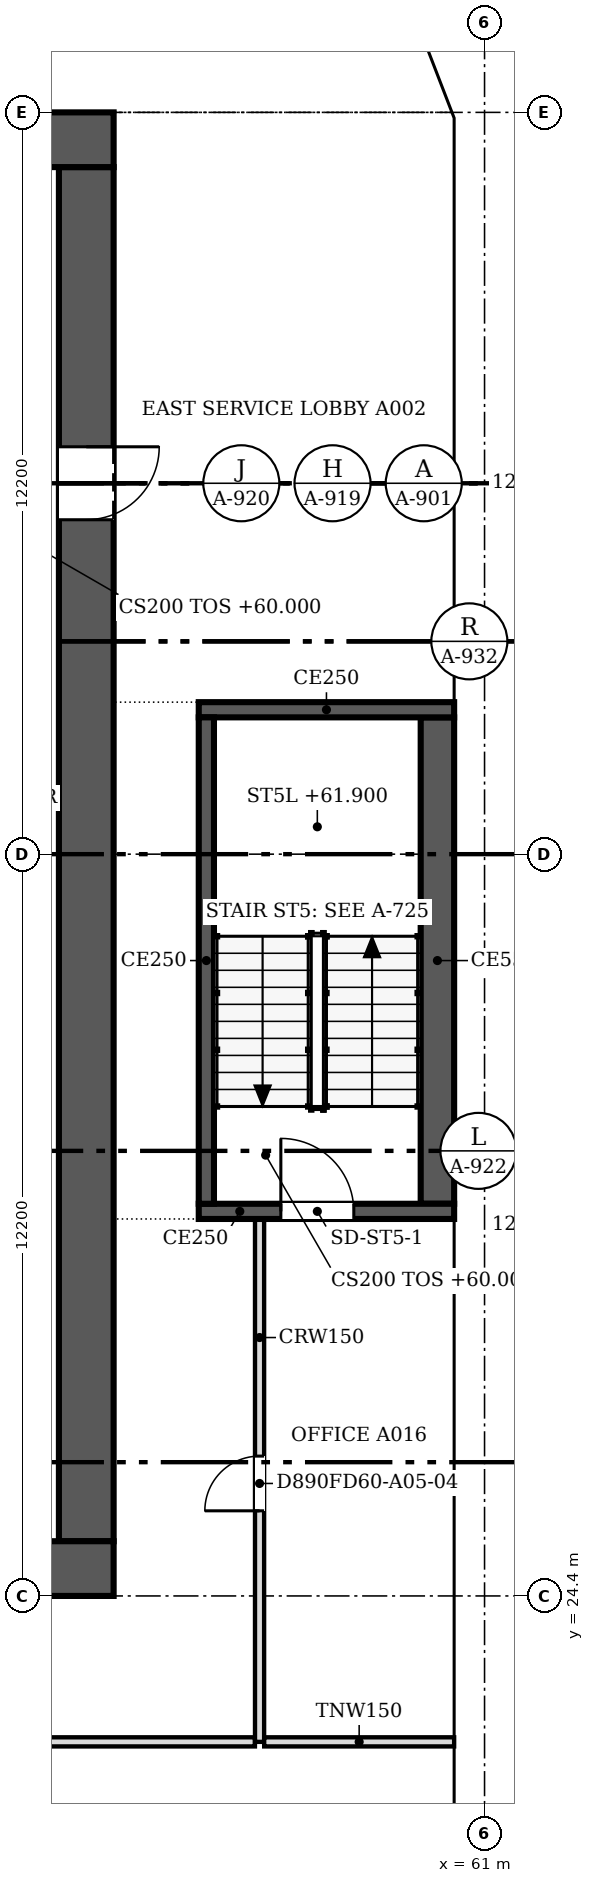
"""IFC4 building model, lengths in metres.
Left out: names, types, materials, properties, quantities, classifications, styles, units other than length and angle.
Written with IfcOpenShell. Run it as: python <this file> out.ifc"""

import sys

from ifc_helpers import new_model, si_unit, direction, frame, frame_2d, origin, place, context, subcontext, project, spatial, polyline, rectangle, outline, extrude, faceted_brep, source, transform, mapped, element, fill, save


model = new_model("IFC4")
c1 = context("Model", 3, precision=1e-05, world=origin(), true_north=direction((0.0, 1.0)))
c2 = subcontext(c1, "Body", "Model", "MODEL_VIEW")
j1 = project(units=[si_unit("LENGTHUNIT", "METRE"), si_unit("PLANEANGLEUNIT", "RADIAN")], contexts=[c1])
p1 = place(None, origin())
s1 = spatial("IfcSite", under=j1, at=p1, CompositionType="ELEMENT")
p2 = place(p1, origin())
s2 = spatial("IfcBuilding", under=s1, at=p2, CompositionType="ELEMENT")
p3 = place(p2, frame((0.0, 0.0, 60.0)))
s3 = spatial("IfcBuildingStorey", under=s2, at=p3, CompositionType="ELEMENT", Elevation=60.0)
m1 = source(origin(), c2, "Body", "SweptSolid", [
    extrude(outline(polyline([(3.05, 0.0), (6.1, 3.8), (3.05, 7.6), (0.0, 3.8), (3.05, 0.0)])), frame((0.0, 0.25, 0.0), z_axis=(0.0, -1.0, 0.0), x_axis=(1.0, 0.0, 0.0)), (0.0, 0.0, 1.0), 0.5),
])
p4 = place(p3, frame((60.75, 15.25, -3.8), z_axis=(0.0, 0.0, 1.0), x_axis=(0.0, 1.0, 0.0)))
e1 = element("IfcWall", 1, at=p4, inside=s3, PredefinedType="SOLIDWALL", context=c2, shape_type="MappedRepresentation", body=[
    mapped(m1, transform((0.0, 0.0, 0.0), scale=1.0)),
])
m2 = source(origin(), c2, "Body", "SweptSolid", [
    extrude(outline(polyline([(3.05, 0.399), (5.78, 3.8), (3.05, 7.201), (0.321, 3.8), (3.05, 0.399)])), frame((0.0, 0.26, 0.0), z_axis=(0.0, -1.0, 0.0), x_axis=(1.0, 0.0, 0.0)), (0.0, 0.0, 1.0), 0.52),
])
p5 = place(p4, origin())
e2 = element("IfcOpeningElement", 2, at=p5, cuts=e1, PredefinedType="OPENING", context=c2, shape_type="MappedRepresentation", body=[
    mapped(m2, transform((0.0, 0.0, 0.0), scale=1.0)),
])
m3 = source(origin(), c2, "Body", "Brep", [
    faceted_brep([(3.05, -0.25, 0.0), (6.1, -0.25, 3.8), (6.1, -0.25, 3.8), (3.05, -0.25, 7.6), (0.0, -0.25, 3.8), (0.0, 0.25, 3.8), (3.05, 0.25, 7.6), (6.1, 0.25, 3.8), (6.1, 0.25, 3.8), (3.05, 0.25, 0.0)], [[[0, 1, 2, 3, 4]], [[5, 6, 7, 8, 9]], [[9, 8, 1, 0]], [[7, 6, 3, 2]], [[6, 5, 4, 3]], [[5, 9, 0, 4]], [[1, 8, 7, 2]]]),
])
p6 = place(p3, frame((60.75, 21.35, -3.8), z_axis=(0.0, 0.0, 1.0), x_axis=(0.0, 1.0, 0.0)))
e3 = element("IfcWall", 3, at=p6, inside=s3, PredefinedType="SOLIDWALL", context=c2, shape_type="MappedRepresentation", body=[
    mapped(m3, transform((0.0, 0.0, 0.0), scale=1.0)),
])
p7 = place(p6, origin())
e4 = element("IfcOpeningElement", 4, at=p7, cuts=e3, PredefinedType="OPENING", context=c2, shape_type="MappedRepresentation", body=[
    mapped(m2, transform((0.0, 0.0, 0.0), scale=1.0)),
])
p8 = place(p3, frame((60.75, 27.45, -3.8), z_axis=(0.0, 0.0, 1.0), x_axis=(0.0, 1.0, 0.0)))
e5 = element("IfcWall", 5, at=p8, inside=s3, PredefinedType="SOLIDWALL", context=c2, shape_type="MappedRepresentation", body=[
    mapped(m1, transform((0.0, 0.0, 0.0), scale=1.0)),
])
p9 = place(p8, origin())
e6 = element("IfcOpeningElement", 6, at=p9, cuts=e5, PredefinedType="OPENING", context=c2, shape_type="MappedRepresentation", body=[
    mapped(m2, transform((0.0, 0.0, 0.0), scale=1.0)),
])
p10 = place(p3, frame((60.75, 33.55, -3.8), z_axis=(0.0, 0.0, 1.0), x_axis=(0.0, 1.0, 0.0)))
e7 = element("IfcWall", 7, at=p10, inside=s3, PredefinedType="SOLIDWALL", context=c2, shape_type="MappedRepresentation", body=[
    mapped(m3, transform((0.0, 0.0, 0.0), scale=1.0)),
])
p11 = place(p10, origin())
e8 = element("IfcOpeningElement", 8, at=p11, cuts=e7, PredefinedType="OPENING", context=c2, shape_type="MappedRepresentation", body=[
    mapped(m2, transform((0.0, 0.0, 0.0), scale=1.0)),
])
p12 = place(p3, frame((60.75, 39.65, -3.8), z_axis=(0.0, 0.0, 1.0), x_axis=(0.0, 1.0, 0.0)))
e9 = element("IfcWall", 9, at=p12, inside=s3, PredefinedType="SOLIDWALL", context=c2, shape_type="MappedRepresentation", body=[
    mapped(m1, transform((0.0, 0.0, 0.0), scale=1.0)),
])
p13 = place(p12, origin())
e10 = element("IfcOpeningElement", 10, at=p13, cuts=e9, PredefinedType="OPENING", context=c2, shape_type="MappedRepresentation", body=[
    mapped(m2, transform((0.0, 0.0, 0.0), scale=1.0)),
])
m4 = source(origin(), c2, "Body", "Brep", [
    faceted_brep([(3.003, -0.25, 0.0), (3.05, -0.25, 0.06), (3.05, -0.25, 7.54), (3.003, -0.25, 7.6), (0.0, -0.25, 3.8), (0.0, 0.25, 3.8), (2.957, 0.25, 7.541), (2.957, 0.25, 0.059), (3.003, 0.0, 0.0), (3.003, 0.0, 7.6)], [[[0, 1, 2, 3, 4]], [[5, 6, 7]], [[1, 0, 8]], [[9, 3, 2]], [[6, 5, 4, 3, 9]], [[5, 7, 8, 0, 4]], [[1, 8, 7, 6, 9, 2]]]),
])
p14 = place(p3, frame((60.75, 45.75, -3.8), z_axis=(0.0, 0.0, 1.0), x_axis=(0.0, 1.0, 0.0)))
e11 = element("IfcWall", 11, at=p14, inside=s3, PredefinedType="SOLIDWALL", context=c2, shape_type="MappedRepresentation", body=[
    mapped(m4, transform((0.0, 0.0, 0.0), scale=1.0)),
])
m5 = source(origin(), c2, "Body", "SweptSolid", [
    extrude(outline(polyline([(2.803, 6.944), (0.319, 3.8), (2.803, 0.656), (2.803, 6.944)])), frame((0.0, 0.26, 0.0), z_axis=(0.0, -1.0, 0.0), x_axis=(1.0, 0.0, 0.0)), (0.0, 0.0, 1.0), 0.52),
])
p15 = place(p14, origin())
e12 = element("IfcOpeningElement", 12, at=p15, cuts=e11, PredefinedType="OPENING", context=c2, shape_type="MappedRepresentation", body=[
    mapped(m5, transform((0.0, 0.0, 0.0), scale=1.0)),
])
m6 = source(origin(), c2, "Body", "Brep", [
    faceted_brep([(0.047, -0.25, 0.0), (2.997, -0.25, 3.8), (0.047, -0.25, 7.6), (0.0, -0.25, 7.541), (0.0, -0.25, 0.059), (0.093, 0.25, 7.54), (2.944, 0.25, 3.868), (2.944, 0.25, 3.732), (0.093, 0.25, 0.06), (2.997, 0.0, 3.8), (0.047, 0.0, 0.0), (0.047, 0.0, 7.6)], [[[0, 1, 2, 3, 4]], [[5, 6, 7, 8]], [[8, 7, 9, 1, 0, 10]], [[6, 5, 11, 2, 1, 9]], [[3, 2, 11]], [[10, 0, 4]], [[8, 10, 4, 3, 11, 5]], [[9, 7, 6]]]),
])
p16 = place(p3, frame((60.767, 48.71, -3.8), z_axis=(0.0, 0.0, 1.0), x_axis=(-0.359901446078, 0.932990326376, 0.0)))
e13 = element("IfcWall", 13, at=p16, inside=s3, PredefinedType="SOLIDWALL", context=c2, shape_type="MappedRepresentation", body=[
    mapped(m6, transform((0.0, 0.0, 0.0), scale=1.0)),
])
m7 = source(origin(), c2, "Body", "SweptSolid", [
    extrude(outline(polyline([(0.247, 0.665), (2.681, 3.8), (0.247, 6.935), (0.247, 0.665)])), frame((0.0, 0.26, 0.0), z_axis=(0.0, -1.0, 0.0), x_axis=(1.0, 0.0, 0.0)), (0.0, 0.0, 1.0), 0.52),
])
p17 = place(p16, origin())
e14 = element("IfcOpeningElement", 14, at=p17, cuts=e13, PredefinedType="OPENING", context=c2, shape_type="MappedRepresentation", body=[
    mapped(m7, transform((0.0, 0.0, 0.0), scale=1.0)),
])
m8 = source(origin(), c2, "Body", "Brep", [
    faceted_brep([(3.05, -0.25, 0.0), (6.1, -0.25, 3.8), (6.1, -0.25, 3.8), (0.0, -0.25, 3.8), (0.0, 0.25, 3.8), (6.1, 0.25, 3.8), (6.1, 0.25, 3.8), (3.05, 0.25, 0.0)], [[[0, 1, 2, 3]], [[4, 5, 6, 7]], [[7, 6, 1, 0]], [[5, 4, 3, 2]], [[4, 7, 0, 3]], [[1, 6, 5, 2]]]),
])
p18 = place(p3, frame((60.75, 18.3, 0.0), z_axis=(0.0, 0.0, 1.0), x_axis=(0.0, 1.0, 0.0)))
e15 = element("IfcWall", 15, at=p18, inside=s3, PredefinedType="SOLIDWALL", context=c2, shape_type="MappedRepresentation", body=[
    mapped(m8, transform((0.0, 0.0, 0.0), scale=1.0)),
])
m9 = source(origin(), c2, "Body", "SweptSolid", [
    extrude(outline(polyline([(3.05, 0.399), (5.579, 3.55), (0.521, 3.55), (3.05, 0.399)])), frame((0.0, 0.26, 0.0), z_axis=(0.0, -1.0, 0.0), x_axis=(1.0, 0.0, 0.0)), (0.0, 0.0, 1.0), 0.52),
])
p19 = place(p18, origin())
e16 = element("IfcOpeningElement", 16, at=p19, cuts=e15, PredefinedType="OPENING", context=c2, shape_type="MappedRepresentation", body=[
    mapped(m9, transform((0.0, 0.0, 0.0), scale=1.0)),
])
m10 = source(origin(), c2, "Body", "SweptSolid", [
    extrude(outline(polyline([(3.05, 0.0), (6.1, 3.8), (0.0, 3.8), (3.05, 0.0)])), frame((0.0, 0.25, 0.0), z_axis=(0.0, -1.0, 0.0), x_axis=(1.0, 0.0, 0.0)), (0.0, 0.0, 1.0), 0.5),
])
p20 = place(p3, frame((60.75, 24.4, 0.0), z_axis=(0.0, 0.0, 1.0), x_axis=(0.0, 1.0, 0.0)))
e17 = element("IfcWall", 17, at=p20, inside=s3, PredefinedType="SOLIDWALL", context=c2, shape_type="MappedRepresentation", body=[
    mapped(m10, transform((0.0, 0.0, 0.0), scale=1.0)),
])
p21 = place(p20, origin())
e18 = element("IfcOpeningElement", 18, at=p21, cuts=e17, PredefinedType="OPENING", context=c2, shape_type="MappedRepresentation", body=[
    mapped(m9, transform((0.0, 0.0, 0.0), scale=1.0)),
])
p22 = place(p3, frame((60.75, 30.5, 0.0), z_axis=(0.0, 0.0, 1.0), x_axis=(0.0, 1.0, 0.0)))
e19 = element("IfcWall", 19, at=p22, inside=s3, PredefinedType="SOLIDWALL", context=c2, shape_type="MappedRepresentation", body=[
    mapped(m10, transform((0.0, 0.0, 0.0), scale=1.0)),
])
p23 = place(p22, origin())
e20 = element("IfcOpeningElement", 20, at=p23, cuts=e19, PredefinedType="OPENING", context=c2, shape_type="MappedRepresentation", body=[
    mapped(m9, transform((0.0, 0.0, 0.0), scale=1.0)),
])
p24 = place(p3, frame((60.75, 36.6, 0.0), z_axis=(0.0, 0.0, 1.0), x_axis=(0.0, 1.0, 0.0)))
e21 = element("IfcWall", 21, at=p24, inside=s3, PredefinedType="SOLIDWALL", context=c2, shape_type="MappedRepresentation", body=[
    mapped(m8, transform((0.0, 0.0, 0.0), scale=1.0)),
])
p25 = place(p24, origin())
e22 = element("IfcOpeningElement", 22, at=p25, cuts=e21, PredefinedType="OPENING", context=c2, shape_type="MappedRepresentation", body=[
    mapped(m9, transform((0.0, 0.0, 0.0), scale=1.0)),
])
m11 = source(origin(), c2, "Body", "Brep", [
    faceted_brep([(3.05, -0.25, 0.0), (6.053, -0.25, 3.8), (0.0, -0.25, 3.8), (0.0, 0.25, 3.8), (6.007, 0.25, 3.8), (6.007, 0.25, 3.741), (3.05, 0.25, 0.0), (6.053, 0.0, 3.8)], [[[0, 1, 2]], [[3, 4, 5, 6]], [[6, 5, 7, 1, 0]], [[4, 3, 2, 1, 7]], [[3, 6, 0, 2]], [[5, 4, 7]]]),
])
p26 = place(p3, frame((60.75, 42.7, 0.0), z_axis=(0.0, 0.0, 1.0), x_axis=(0.0, 1.0, 0.0)))
e23 = element("IfcWall", 23, at=p26, inside=s3, PredefinedType="SOLIDWALL", context=c2, shape_type="MappedRepresentation", body=[
    mapped(m11, transform((0.0, 0.0, 0.0), scale=1.0)),
])
m12 = source(origin(), c2, "Body", "SweptSolid", [
    extrude(outline(polyline([(3.049, 0.401), (5.537, 3.55), (0.521, 3.55), (3.049, 0.401)])), frame((0.0, 0.26, 0.0), z_axis=(0.0, -1.0, 0.0), x_axis=(1.0, 0.0, 0.0)), (0.0, 0.0, 1.0), 0.52),
])
p27 = place(p26, origin())
e24 = element("IfcOpeningElement", 24, at=p27, cuts=e23, PredefinedType="OPENING", context=c2, shape_type="MappedRepresentation", body=[
    mapped(m12, transform((0.0, 0.0, 0.0), scale=1.0)),
])
m13 = source(origin(), c2, "Body", "Brep", [
    faceted_brep([(2.95, -0.25, 0.0), (3.003, -0.25, 0.068), (3.003, -0.25, 3.8), (0.0, -0.25, 3.8), (0.047, 0.25, 3.8), (2.898, 0.25, 3.8), (2.898, 0.25, 0.068), (0.047, 0.25, 3.74), (2.95, 0.0, 0.0), (0.0, 0.0, 3.8)], [[[0, 1, 2, 3]], [[4, 5, 6, 7]], [[1, 0, 8]], [[5, 4, 9, 3, 2]], [[7, 6, 8, 0, 3, 9]], [[7, 9, 4]], [[1, 8, 6, 5, 2]]]),
])
p28 = place(p3, frame((60.75, 48.753, 0.0), z_axis=(0.0, 0.0, 1.0), x_axis=(-0.35992665181, 0.932980602862, 0.0)))
e25 = element("IfcWall", 25, at=p28, inside=s3, PredefinedType="SOLIDWALL", context=c2, shape_type="MappedRepresentation", body=[
    mapped(m13, transform((0.0, 0.0, 0.0), scale=1.0)),
])
m14 = source(origin(), c2, "Body", "SweptSolid", [
    extrude(outline(polyline([(2.75, 3.55), (0.511, 3.55), (2.75, 0.665), (2.75, 3.55)])), frame((0.0, 0.26, 0.0), z_axis=(0.0, -1.0, 0.0), x_axis=(1.0, 0.0, 0.0)), (0.0, 0.0, 1.0), 0.52),
])
p29 = place(p28, origin())
e26 = element("IfcOpeningElement", 26, at=p29, cuts=e25, PredefinedType="OPENING", context=c2, shape_type="MappedRepresentation", body=[
    mapped(m14, transform((0.0, 0.0, 0.0), scale=1.0)),
])
p30 = place(p3, frame((54.9, 24.85, 0.0), z_axis=(0.0, 0.0, 1.0), x_axis=(-1.0, 0.0, 0.0)))
e27 = element("IfcWall", 27, at=p30, inside=s3, PredefinedType="SHEAR", context=c2, shape_type="SweptSolid", body=[
    extrude(rectangle(XDim=24.4, YDim=0.9, at=frame_2d((12.2, 0.0))), origin(), (0.0, 0.0, 1.0), 3.8),
])
m15 = source(origin(), c2, "Body", "SweptSolid", [
    extrude(rectangle(XDim=1.2, YDim=2.1, at=frame_2d((0.6, 1.05))), frame((0.0, 0.46, 0.0), z_axis=(0.0, -1.0, 0.0), x_axis=(1.0, 0.0, 0.0)), (0.0, 0.0, 1.0), 0.92),
])
p31 = place(p30, frame((1.5, 0.0, 0.0)))
e28 = element("IfcOpeningElement", 28, at=p31, cuts=e27, PredefinedType="OPENING", context=c2, shape_type="MappedRepresentation", body=[
    mapped(m15, transform((0.0, 0.0, 0.0), scale=1.0)),
])
p32 = place(p3, frame((30.5, 48.35, 0.0), z_axis=(0.0, 0.0, 1.0), x_axis=(1.0, 0.0, 0.0)))
e29 = element("IfcWall", 29, at=p32, inside=s3, PredefinedType="SHEAR", context=c2, shape_type="SweptSolid", body=[
    extrude(rectangle(XDim=24.4, YDim=0.9, at=frame_2d((12.2, 0.0))), origin(), (0.0, 0.0, 1.0), 3.8),
])
p33 = place(p3, frame((54.45, 47.9, 0.0), z_axis=(0.0, 0.0, 1.0), x_axis=(0.0, -1.0, 0.0)))
e30 = element("IfcWall", 30, at=p33, inside=s3, PredefinedType="SHEAR", context=c2, shape_type="SweptSolid", body=[
    extrude(rectangle(XDim=22.6, YDim=0.9, at=frame_2d((11.3, 0.0))), origin(), (0.0, 0.0, 1.0), 3.8),
])
p34 = place(p33, frame((4.6, 0.0, 0.0)))
e31 = element("IfcOpeningElement", 31, at=p34, cuts=e30, PredefinedType="OPENING", context=c2, shape_type="MappedRepresentation", body=[
    mapped(m15, transform((0.0, 0.0, 0.0), scale=1.0)),
])
p35 = place(p3, frame((60.5, 30.725, 0.0), z_axis=(0.0, 0.0, 1.0), x_axis=(-1.0, 0.0, 0.0)))
e32 = element("IfcWall", 32, at=p35, inside=s3, PredefinedType="SOLIDWALL", context=c2, shape_type="SweptSolid", body=[
    extrude(rectangle(XDim=4.2, YDim=0.25, at=frame_2d((2.1, 0.0))), origin(), (0.0, 0.0, 1.0), 3.8),
])
m16 = source(origin(), c2, "Body", "SweptSolid", [
    extrude(rectangle(XDim=1.2, YDim=2.1, at=frame_2d((0.6, 1.05))), frame((0.0, 0.135, 0.0), z_axis=(0.0, -1.0, 0.0), x_axis=(1.0, 0.0, 0.0)), (0.0, 0.0, 1.0), 0.27),
])
p36 = place(p35, frame((1.65, 0.0, 0.0)))
e33 = element("IfcOpeningElement", 33, at=p36, cuts=e32, PredefinedType="OPENING", context=c2, shape_type="MappedRepresentation", body=[
    mapped(m16, transform((0.0, 0.0, 0.0), scale=1.0)),
])
p37 = place(p3, frame((56.425, 30.85, 0.0), z_axis=(0.0, 0.0, 1.0), x_axis=(0.0, 1.0, 0.0)))
e34 = element("IfcWall", 34, at=p37, inside=s3, PredefinedType="SOLIDWALL", context=c2, shape_type="SweptSolid", body=[
    extrude(rectangle(XDim=8.0, YDim=0.25, at=frame_2d((4.0, 0.0))), origin(), (0.0, 0.0, 1.0), 3.8),
])
p38 = place(p3, frame((56.3, 38.975, 0.0), z_axis=(0.0, 0.0, 1.0), x_axis=(1.0, 0.0, 0.0)))
e35 = element("IfcWall", 35, at=p38, inside=s3, PredefinedType="SOLIDWALL", context=c2, shape_type="SweptSolid", body=[
    extrude(rectangle(XDim=4.2, YDim=0.25, at=frame_2d((2.1, 0.0))), origin(), (0.0, 0.0, 1.0), 3.8),
])
p39 = place(p3, frame((60.225, 38.85, 0.0), z_axis=(0.0, 0.0, 1.0), x_axis=(0.0, -1.0, 0.0)))
e36 = element("IfcWall", 36, at=p39, inside=s3, PredefinedType="SOLIDWALL", context=c2, shape_type="SweptSolid", body=[
    extrude(rectangle(XDim=8.0, YDim=0.55, at=frame_2d((4.0, 0.0))), origin(), (0.0, 0.0, 1.0), 3.8),
])
p40 = place(p3, frame((45.476, 22.0, 0.0), z_axis=(0.0, 0.0, 1.0), x_axis=(1.0, 0.0, 0.0)))
e37 = element("IfcWall", 37, at=p40, inside=s3, PredefinedType="PARTITIONING", context=c2, shape_type="SweptSolid", body=[
    extrude(rectangle(XDim=11.748, YDim=0.15, at=frame_2d((5.874, 0.0))), origin(), (0.0, 0.0, 1.0), 2.888),
])
p41 = place(p3, frame((57.3, 30.6, 0.0), z_axis=(0.0, 0.0, 1.0), x_axis=(0.0, -1.0, 0.0)))
e38 = element("IfcWall", 38, at=p41, inside=s3, PredefinedType="PARTITIONING", context=c2, shape_type="SweptSolid", body=[
    extrude(rectangle(XDim=8.6, YDim=0.15, at=frame_2d((4.3, 0.0))), origin(), (0.0, 0.0, 1.0), 2.888),
])
m17 = source(origin(), c2, "Body", "SweptSolid", [
    extrude(rectangle(XDim=0.9, YDim=2.1, at=frame_2d((0.45, 1.05))), frame((0.0, 0.085, 0.0), z_axis=(0.0, -1.0, 0.0), x_axis=(1.0, 0.0, 0.0)), (0.0, 0.0, 1.0), 0.17),
])
p42 = place(p41, frame((3.9, 0.0, 0.0)))
e39 = element("IfcOpeningElement", 39, at=p42, cuts=e38, PredefinedType="OPENING", context=c2, shape_type="MappedRepresentation", body=[
    mapped(m17, transform((0.0, 0.0, 0.0), scale=1.0)),
])
p43 = place(p3, frame((57.376, 22.0, 0.0), z_axis=(0.0, 0.0, 1.0), x_axis=(1.0, 0.0, 0.0)))
e40 = element("IfcWall", 40, at=p43, inside=s3, PredefinedType="PARTITIONING", context=c2, shape_type="SweptSolid", body=[
    extrude(rectangle(XDim=3.124, YDim=0.15, at=frame_2d((1.562, 0.0))), origin(), (0.0, 0.0, 1.0), 2.888),
])
m18 = source(origin(), c2, "Body", "SweptSolid", [
    extrude(rectangle(XDim=1.2, YDim=2.1, at=frame_2d((0.6, 1.05))), frame((0.0, 0.025, 0.0), z_axis=(0.0, -1.0, 0.0), x_axis=(1.0, 0.0, 0.0)), (0.0, 0.0, 1.0), 0.05),
])
p44 = place(p34, origin())
e41 = element("IfcDoor", 41, at=p44, inside=s3, OperationType="SINGLE_SWING_LEFT", PredefinedType="DOOR", context=c2, shape_type="MappedRepresentation", body=[
    mapped(m18, transform((0.0, 0.0, 0.0), scale=1.0)),
])
fill(e31, e41)
p45 = place(p36, origin())
e42 = element("IfcDoor", 42, at=p45, inside=s3, OperationType="SINGLE_SWING_RIGHT", PredefinedType="DOOR", context=c2, shape_type="MappedRepresentation", body=[
    mapped(m18, transform((0.0, 0.0, 0.0), scale=1.0)),
])
fill(e33, e42)
m19 = source(origin(), c2, "Body", "SweptSolid", [
    extrude(rectangle(XDim=0.9, YDim=2.1, at=frame_2d((0.45, 1.05))), frame((0.0, 0.025, 0.0), z_axis=(0.0, -1.0, 0.0), x_axis=(1.0, 0.0, 0.0)), (0.0, 0.0, 1.0), 0.05),
])
p46 = place(p42, origin())
e43 = element("IfcDoor", 43, at=p46, inside=s3, OperationType="SINGLE_SWING_RIGHT", PredefinedType="DOOR", context=c2, shape_type="MappedRepresentation", body=[
    mapped(m19, transform((0.0, 0.0, 0.0), scale=1.0)),
])
fill(e39, e43)
save(model, sys.argv[1])
